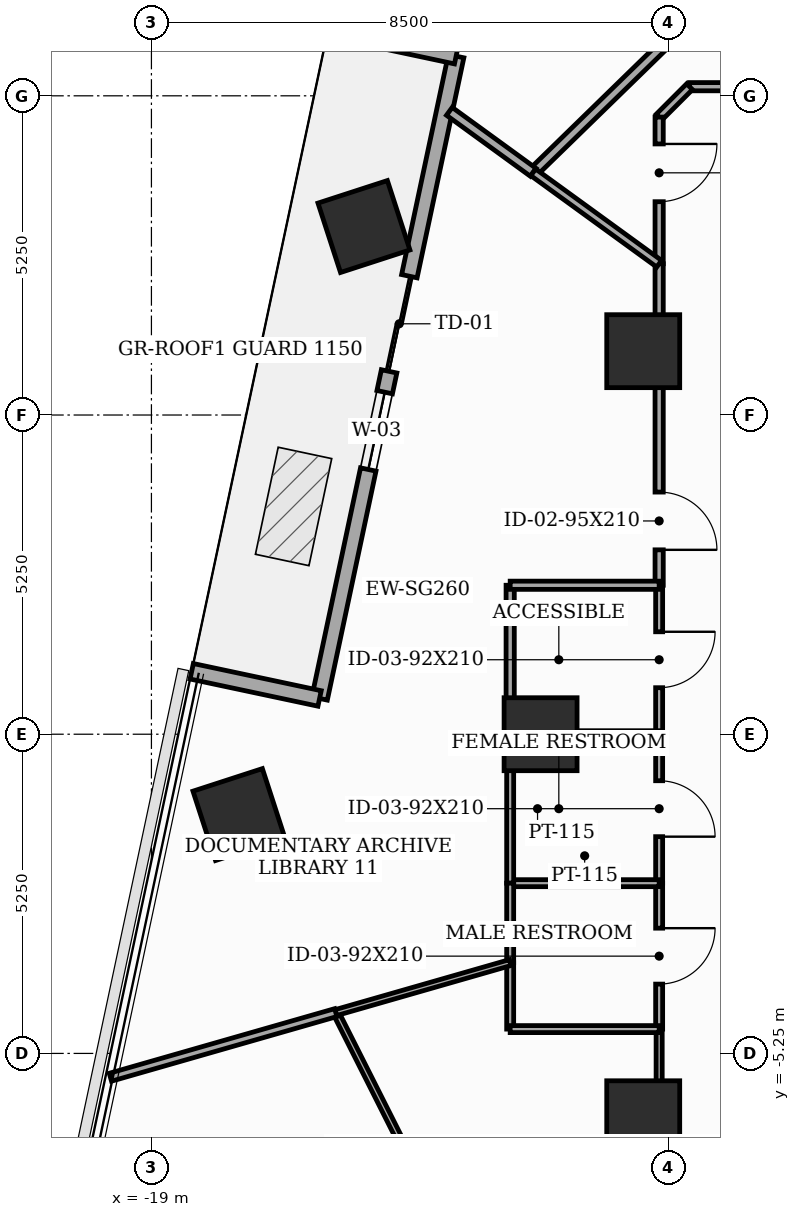
"""IFC4 building model, lengths in metres.
Left out: names, types, materials, properties, quantities, classifications, styles, units other than length and angle.
Written with IfcOpenShell. Run it as: python <this file> out.ifc"""

import sys

from ifc_helpers import new_model, si_unit, direction, frame, frame_2d, origin, origin_2d, place, context, subcontext, project, spatial, rectangle, extrude, element, fill, save


model = new_model("IFC4")
c1 = context("Model", 3, precision=1e-05, world=origin(), true_north=direction((0.0, 1.0)))
c2 = subcontext(c1, "Body", "Model", "MODEL_VIEW")
j1 = project(units=[si_unit("LENGTHUNIT", "METRE"), si_unit("PLANEANGLEUNIT", "RADIAN")], contexts=[c1])
p1 = place(None, origin())
s1 = spatial("IfcSite", under=j1, at=p1, CompositionType="ELEMENT")
p2 = place(p1, origin())
s2 = spatial("IfcBuilding", under=s1, at=p2, CompositionType="ELEMENT")
p3 = place(p2, frame((0.0, 0.0, 97.7)))
s3 = spatial("IfcBuildingStorey", under=s2, at=p3, CompositionType="ELEMENT", Elevation=97.7)
for number, where, z_axis, x_axis in (
    (1, (-10.912, 6.3, 0.0), (0.0, 0.0, 1.0), (1.0, 0.0, 0.0)),
    (2, (-12.6, 0.0, 0.0), (0.0, 0.0, 1.0), (1.0, 0.0, 0.0)),
    (3, (-10.912, -6.3, 0.0), (0.0, 0.0, 1.0), (1.0, 0.0, 0.0)),
    (4, (-15.505, 8.35, 0.0), (0.0, 0.0, 1.0), (0.951, 0.309, 0.0)),
    (5, (-17.561, -1.322, 0.0), (0.0, 0.0, 1.0), (0.951, 0.309, 0.0)),
):
    element("IfcColumn", number, at=place(p3, frame(where, z_axis=z_axis, x_axis=x_axis)), inside=s3, PredefinedType="COLUMN", context=c2, shape_type="SweptSolid", body=[
        extrude(rectangle(XDim=1.2, YDim=1.2, at=origin_2d()), origin(), (0.0, 0.0, 1.0), 3.7),
    ])
p4 = place(p3, frame((-13.989, 11.152, 0.0), z_axis=(0.0, 0.0, 1.0), x_axis=(-0.207926345708, -0.978144485626, 0.0)))
e6 = element("IfcWall", 6, at=p4, inside=s3, PredefinedType="SOLIDWALL", context=c2, shape_type="SweptSolid", body=[
    extrude(rectangle(XDim=10.8, YDim=0.26, at=frame_2d((5.4, 0.0))), origin(), (0.0, 0.0, 1.0), 3.5),
])
p5 = place(p4, frame((3.7, 0.0, 0.0)))
e7 = element("IfcOpeningElement", 7, at=p5, cuts=e6, PredefinedType="OPENING", context=c2, shape_type="SweptSolid", body=[
    extrude(rectangle(XDim=1.6, YDim=2.08, at=frame_2d((0.8, 1.04))), frame((0.0, 0.14, 0.0), z_axis=(0.0, -1.0, 0.0), x_axis=(1.0, 0.0, 0.0)), (0.0, 0.0, 1.0), 0.28),
])
p6 = place(p4, frame((5.65, 0.0, 0.85)))
e8 = element("IfcOpeningElement", 8, at=p6, cuts=e6, PredefinedType="OPENING", context=c2, shape_type="SweptSolid", body=[
    extrude(rectangle(XDim=1.3, YDim=1.25, at=frame_2d((0.65, 0.625))), frame((0.0, 0.14, 0.0), z_axis=(0.0, -1.0, 0.0), x_axis=(1.0, 0.0, 0.0)), (0.0, 0.0, 1.0), 0.28),
])
for number, where, z_axis, x_axis in (
    (9, (-16.092, 11.599, 0.0), (0.0, 0.0, 1.0), (0.978, -0.208, 0.0)),
    (10, (-16.235, 0.588, 0.0), (0.0, 0.0, 1.0), (-0.978, 0.208, 0.0)),
):
    element("IfcWall", number, at=place(p3, frame(where, z_axis=z_axis, x_axis=x_axis)), inside=s3, PredefinedType="SOLIDWALL", context=c2, shape_type="SweptSolid", body=[
        extrude(rectangle(XDim=2.15, YDim=0.26, at=frame_2d((1.075, 0.0))), origin(), (0.0, 0.0, 1.0), 3.5),
    ])
p7 = place(p3, frame((-10.65, 0.0, 0.0), z_axis=(0.0, 0.0, 1.0), x_axis=(0.0, -1.0, 0.0)))
e11 = element("IfcWall", 11, at=p7, inside=s3, PredefinedType="PARTITIONING", context=c2, shape_type="SweptSolid", body=[
    extrude(rectangle(XDim=2.45, YDim=0.115, at=frame_2d((1.225, 0.0))), origin(), (0.0, 0.0, 1.0), 2.785),
])
p8 = place(p7, frame((0.765, 0.0, 0.0)))
e12 = element("IfcOpeningElement", 12, at=p8, cuts=e11, PredefinedType="OPENING", context=c2, shape_type="SweptSolid", body=[
    extrude(rectangle(XDim=0.92, YDim=2.1, at=frame_2d((0.46, 1.05))), frame((0.0, 0.067, 0.0), z_axis=(0.0, -1.0, 0.0), x_axis=(1.0, 0.0, 0.0)), (0.0, 0.0, 1.0), 0.135),
])
p9 = place(p3, frame((-10.65, -2.45, 0.0), z_axis=(0.0, 0.0, 1.0), x_axis=(0.0, -1.0, 0.0)))
e13 = element("IfcWall", 13, at=p9, inside=s3, PredefinedType="PARTITIONING", context=c2, shape_type="SweptSolid", body=[
    extrude(rectangle(XDim=2.4, YDim=0.115, at=frame_2d((1.2, 0.0))), origin(), (0.0, 0.0, 1.0), 3.5),
])
p10 = place(p9, frame((0.74, 0.0, 0.0)))
e14 = element("IfcOpeningElement", 14, at=p10, cuts=e13, PredefinedType="OPENING", context=c2, shape_type="SweptSolid", body=[
    extrude(rectangle(XDim=0.92, YDim=2.1, at=frame_2d((0.46, 1.05))), frame((0.0, 0.067, 0.0), z_axis=(0.0, -1.0, 0.0), x_axis=(1.0, 0.0, 0.0)), (0.0, 0.0, 1.0), 0.135),
])
p11 = place(p3, frame((-10.65, -4.85, 0.0), z_axis=(0.0, 0.0, 1.0), x_axis=(0.0, -1.0, 0.0)))
e15 = element("IfcWall", 15, at=p11, inside=s3, PredefinedType="MOVABLE", context=c2, shape_type="SweptSolid", body=[
    extrude(rectangle(XDim=5.3, YDim=0.1, at=frame_2d((2.65, 0.0))), origin(), (0.0, 0.0, 1.0), 2.785),
])
p12 = place(p11, frame((3.765, 0.0, 0.0)))
e16 = element("IfcOpeningElement", 16, at=p12, cuts=e15, PredefinedType="OPENING", context=c2, shape_type="SweptSolid", body=[
    extrude(rectangle(XDim=0.95, YDim=2.1, at=frame_2d((0.475, 1.05))), frame((0.0, 0.06, 0.0), z_axis=(0.0, -1.0, 0.0), x_axis=(1.0, 0.0, 0.0)), (0.0, 0.0, 1.0), 0.12),
])
p13 = place(p3, frame((-2.264, 10.65, 0.0), z_axis=(0.0, 0.0, 1.0), x_axis=(-1.0, 0.0, 0.0)))
e17 = element("IfcWall", 17, at=p13, inside=s3, PredefinedType="PARTITIONING", context=c2, shape_type="SweptSolid", body=[
    extrude(rectangle(XDim=7.886, YDim=0.135, at=frame_2d((3.943, 0.0))), origin(), (0.0, 0.0, 1.0), 2.785),
])
p14 = place(p3, frame((-10.15, 10.65, 0.0), z_axis=(0.0, 0.0, 1.0), x_axis=(-0.707106781187, -0.707106781187, 0.0)))
e18 = element("IfcWall", 18, at=p14, inside=s3, PredefinedType="PARTITIONING", context=c2, shape_type="SweptSolid", body=[
    extrude(rectangle(XDim=0.707, YDim=0.135, at=frame_2d((0.354, 0.0))), origin(), (0.0, 0.0, 1.0), 3.5),
])
p15 = place(p3, frame((-10.65, 10.15, 0.0), z_axis=(0.0, 0.0, 1.0), x_axis=(0.0, -1.0, 0.0)))
e19 = element("IfcWall", 19, at=p15, inside=s3, PredefinedType="PARTITIONING", context=c2, shape_type="SweptSolid", body=[
    extrude(rectangle(XDim=2.412, YDim=0.135, at=frame_2d((1.206, 0.0))), origin(), (0.0, 0.0, 1.0), 3.5),
])
p16 = place(p15, frame((0.442, 0.0, 0.0)))
e20 = element("IfcOpeningElement", 20, at=p16, cuts=e19, PredefinedType="OPENING", context=c2, shape_type="SweptSolid", body=[
    extrude(rectangle(XDim=0.95, YDim=2.1, at=frame_2d((0.475, 1.05))), frame((0.0, 0.077, 0.0), z_axis=(0.0, -1.0, 0.0), x_axis=(1.0, 0.0, 0.0)), (0.0, 0.0, 1.0), 0.155),
])
p17 = place(p3, frame((-10.65, 7.738, 0.0), z_axis=(0.0, 0.0, 1.0), x_axis=(0.0, -1.0, 0.0)))
e21 = element("IfcWall", 21, at=p17, inside=s3, PredefinedType="PARTITIONING", context=c2, shape_type="SweptSolid", body=[
    extrude(rectangle(XDim=5.288, YDim=0.135, at=frame_2d((2.644, 0.0))), origin(), (0.0, 0.0, 1.0), 2.785),
])
p18 = place(p17, frame((3.755, 0.0, 0.0)))
e22 = element("IfcOpeningElement", 22, at=p18, cuts=e21, PredefinedType="OPENING", context=c2, shape_type="SweptSolid", body=[
    extrude(rectangle(XDim=0.95, YDim=2.1, at=frame_2d((0.475, 1.05))), frame((0.0, 0.077, 0.0), z_axis=(0.0, -1.0, 0.0), x_axis=(1.0, 0.0, 0.0)), (0.0, 0.0, 1.0), 0.155),
])
p19 = place(p3, frame((-10.65, 2.45, 0.0), z_axis=(0.0, 0.0, 1.0), x_axis=(0.0, -1.0, 0.0)))
e23 = element("IfcWall", 23, at=p19, inside=s3, PredefinedType="PARTITIONING", context=c2, shape_type="SweptSolid", body=[
    extrude(rectangle(XDim=2.45, YDim=0.115, at=frame_2d((1.225, 0.0))), origin(), (0.0, 0.0, 1.0), 2.785),
])
p20 = place(p19, frame((0.765, 0.0, 0.0)))
e24 = element("IfcOpeningElement", 24, at=p20, cuts=e23, PredefinedType="OPENING", context=c2, shape_type="SweptSolid", body=[
    extrude(rectangle(XDim=0.92, YDim=2.1, at=frame_2d((0.46, 1.05))), frame((0.0, 0.067, 0.0), z_axis=(0.0, -1.0, 0.0), x_axis=(1.0, 0.0, 0.0)), (0.0, 0.0, 1.0), 0.135),
])
p21 = place(p3, frame((-13.1, -2.45, 0.0), z_axis=(0.0, 0.0, 1.0), x_axis=(1.0, 0.0, 0.0)))
e25 = element("IfcWall", 25, at=p21, inside=s3, PredefinedType="PARTITIONING", context=c2, shape_type="SweptSolid", body=[
    extrude(rectangle(XDim=2.45, YDim=0.115, at=frame_2d((1.225, 0.0))), origin(), (0.0, 0.0, 1.0), 2.785),
])
p22 = place(p3, frame((-13.1, 0.0, 0.0), z_axis=(0.0, 0.0, 1.0), x_axis=(0.0, -1.0, 0.0)))
e26 = element("IfcWall", 26, at=p22, inside=s3, PredefinedType="PARTITIONING", context=c2, shape_type="SweptSolid", body=[
    extrude(rectangle(XDim=2.45, YDim=0.115, at=frame_2d((1.225, 0.0))), origin(), (0.0, 0.0, 1.0), 2.785),
])
p23 = place(p3, frame((-10.65, 0.0, 0.0), z_axis=(0.0, 0.0, 1.0), x_axis=(-1.0, 0.0, 0.0)))
e27 = element("IfcWall", 27, at=p23, inside=s3, PredefinedType="PARTITIONING", context=c2, shape_type="SweptSolid", body=[
    extrude(rectangle(XDim=2.45, YDim=0.115, at=frame_2d((1.225, 0.0))), origin(), (0.0, 0.0, 1.0), 2.785),
])
p24 = place(p3, frame((-13.1, -3.756, 0.0), z_axis=(0.0, 0.0, 1.0), x_axis=(0.0, -1.0, 0.0)))
e28 = element("IfcWall", 28, at=p24, inside=s3, PredefinedType="PARTITIONING", context=c2, shape_type="SweptSolid", body=[
    extrude(rectangle(XDim=1.094, YDim=0.115, at=frame_2d((0.547, 0.0))), origin(), (0.0, 0.0, 1.0), 3.5),
])
p25 = place(p3, frame((-13.1, -4.85, 0.0), z_axis=(0.0, 0.0, 1.0), x_axis=(1.0, 0.0, 0.0)))
e29 = element("IfcWall", 29, at=p25, inside=s3, PredefinedType="PARTITIONING", context=c2, shape_type="SweptSolid", body=[
    extrude(rectangle(XDim=2.45, YDim=0.115, at=frame_2d((1.225, 0.0))), origin(), (0.0, 0.0, 1.0), 2.785),
])
p26 = place(p3, frame((-13.1, -2.45, 0.0), z_axis=(0.0, 0.0, 1.0), x_axis=(0.0, -1.0, 0.0)))
e30 = element("IfcWall", 30, at=p26, inside=s3, PredefinedType="PARTITIONING", context=c2, shape_type="SweptSolid", body=[
    extrude(rectangle(XDim=1.306, YDim=0.115, at=frame_2d((0.653, 0.0))), origin(), (0.0, 0.0, 1.0), 3.5),
])
p27 = place(p3, frame((-15.968, -4.579, 0.0), z_axis=(0.0, 0.0, 1.0), x_axis=(0.450166439867, -0.892944665933, 0.0)))
e31 = element("IfcWall", 31, at=p27, inside=s3, PredefinedType="MOVABLE", context=c2, shape_type="SweptSolid", body=[
    extrude(rectangle(XDim=6.642, YDim=0.1, at=frame_2d((3.321, 0.0))), origin(), (0.0, 0.0, 1.0), 2.785),
])
p28 = place(p3, frame((-13.1, -3.756, 0.0), z_axis=(0.0, 0.0, 1.0), x_axis=(-0.961205264208, -0.275834080671, 0.0)))
e32 = element("IfcWall", 32, at=p28, inside=s3, PredefinedType="MOVABLE", context=c2, shape_type="SweptSolid", body=[
    extrude(rectangle(XDim=2.984, YDim=0.1, at=frame_2d((1.492, 0.0))), origin(), (0.0, 0.0, 1.0), 3.125),
])
p29 = place(p3, frame((-15.968, -4.579, 0.0), z_axis=(0.0, 0.0, 1.0), x_axis=(-0.961294264275, -0.275523751194, 0.0)))
e33 = element("IfcWall", 33, at=p29, inside=s3, PredefinedType="PARTITIONING", context=c2, shape_type="SweptSolid", body=[
    extrude(rectangle(XDim=3.856, YDim=0.135, at=frame_2d((1.928, 0.0))), origin(), (0.0, 0.0, 1.0), 2.935),
])
p30 = place(p3, frame((-12.721, 9.242, 0.0), z_axis=(0.0, 0.0, 1.0), x_axis=(0.716351016203, 0.697740081682, 0.0)))
e34 = element("IfcWall", 34, at=p30, inside=s3, PredefinedType="PARTITIONING", context=c2, shape_type="SweptSolid", body=[
    extrude(rectangle(XDim=5.746, YDim=0.16, at=frame_2d((2.873, 0.0))), origin(), (0.0, 0.0, 1.0), 2.785),
])
p31 = place(p3, frame((-14.1, 10.245, 0.0), z_axis=(0.0, 0.0, 1.0), x_axis=(0.808828948323, -0.588043988452, 0.0)))
e35 = element("IfcWall", 35, at=p31, inside=s3, PredefinedType="PARTITIONING", context=c2, shape_type="SweptSolid", body=[
    extrude(rectangle(XDim=1.705, YDim=0.16, at=frame_2d((0.853, 0.0))), origin(), (0.0, 0.0, 1.0), 3.125),
])
p32 = place(p3, frame((-12.721, 9.242, 0.0), z_axis=(0.0, 0.0, 1.0), x_axis=(0.80916485127, -0.58758169089, 0.0)))
e36 = element("IfcWall", 36, at=p32, inside=s3, PredefinedType="PARTITIONING", context=c2, shape_type="SweptSolid", body=[
    extrude(rectangle(XDim=2.56, YDim=0.135, at=frame_2d((1.28, 0.0))), origin(), (0.0, 0.0, 1.0), 3.125),
])
p33 = place(p3, frame((-13.1, 0.0, 0.0), z_axis=(0.0, 0.0, 1.0), x_axis=(0.0, 1.0, 0.0)))
e37 = element("IfcWall", 37, at=p33, inside=s3, PredefinedType="PARTITIONING", context=c2, shape_type="SweptSolid", body=[
    extrude(rectangle(XDim=2.45, YDim=0.135, at=frame_2d((1.225, 0.0))), origin(), (0.0, 0.0, 1.0), 2.785),
])
p34 = place(p3, frame((-13.1, 2.45, 0.0), z_axis=(0.0, 0.0, 1.0), x_axis=(1.0, 0.0, 0.0)))
e38 = element("IfcWall", 38, at=p34, inside=s3, PredefinedType="PARTITIONING", context=c2, shape_type="SweptSolid", body=[
    extrude(rectangle(XDim=2.45, YDim=0.135, at=frame_2d((1.225, 0.0))), origin(), (0.0, 0.0, 1.0), 2.785),
])
p35 = place(p5, frame((1.6, 0.0, 0.0), z_axis=(0.0, 0.0, 1.0), x_axis=(-1.0, 0.0, 0.0)))
e39 = element("IfcDoor", 39, at=p35, inside=s3, OperationType="DOUBLE_DOOR_SLIDING", PredefinedType="DOOR", context=c2, shape_type="SweptSolid", body=[
    extrude(rectangle(XDim=1.6, YDim=2.08, at=frame_2d((0.8, 1.04))), frame((0.0, 0.025, 0.0), z_axis=(0.0, -1.0, 0.0), x_axis=(1.0, 0.0, 0.0)), (0.0, 0.0, 1.0), 0.05),
])
fill(e7, e39)
p36 = place(p6, origin())
e40 = element("IfcWindow", 40, at=p36, inside=s3, PartitioningType="SINGLE_PANEL", PredefinedType="WINDOW", context=c2, shape_type="SweptSolid", body=[
    extrude(rectangle(XDim=1.3, YDim=1.25, at=frame_2d((0.65, 0.625))), frame((0.0, 0.03, 0.0), z_axis=(0.0, -1.0, 0.0), x_axis=(1.0, 0.0, 0.0)), (0.0, 0.0, 1.0), 0.06),
])
fill(e8, e40)
p37 = place(p8, origin())
e41 = element("IfcDoor", 41, at=p37, inside=s3, OperationType="SINGLE_SWING_RIGHT", PredefinedType="DOOR", context=c2, shape_type="SweptSolid", body=[
    extrude(rectangle(XDim=0.92, YDim=2.1, at=frame_2d((0.46, 1.05))), frame((0.0, 0.025, 0.0), z_axis=(0.0, -1.0, 0.0), x_axis=(1.0, 0.0, 0.0)), (0.0, 0.0, 1.0), 0.05),
])
fill(e12, e41)
p38 = place(p10, origin())
e42 = element("IfcDoor", 42, at=p38, inside=s3, OperationType="SINGLE_SWING_LEFT", PredefinedType="DOOR", context=c2, shape_type="SweptSolid", body=[
    extrude(rectangle(XDim=0.92, YDim=2.1, at=frame_2d((0.46, 1.05))), frame((0.0, 0.025, 0.0), z_axis=(0.0, -1.0, 0.0), x_axis=(1.0, 0.0, 0.0)), (0.0, 0.0, 1.0), 0.05),
])
fill(e14, e42)
p39 = place(p16, origin())
e43 = element("IfcDoor", 43, at=p39, inside=s3, OperationType="SINGLE_SWING_LEFT", PredefinedType="DOOR", context=c2, shape_type="SweptSolid", body=[
    extrude(rectangle(XDim=0.95, YDim=2.1, at=frame_2d((0.475, 1.05))), frame((0.0, 0.025, 0.0), z_axis=(0.0, -1.0, 0.0), x_axis=(1.0, 0.0, 0.0)), (0.0, 0.0, 1.0), 0.05),
])
fill(e20, e43)
p40 = place(p18, origin())
e44 = element("IfcDoor", 44, at=p40, inside=s3, OperationType="SINGLE_SWING_RIGHT", PredefinedType="DOOR", context=c2, shape_type="SweptSolid", body=[
    extrude(rectangle(XDim=0.95, YDim=2.1, at=frame_2d((0.475, 1.05))), frame((0.0, 0.025, 0.0), z_axis=(0.0, -1.0, 0.0), x_axis=(1.0, 0.0, 0.0)), (0.0, 0.0, 1.0), 0.05),
])
fill(e22, e44)
p41 = place(p20, origin())
e45 = element("IfcDoor", 45, at=p41, inside=s3, OperationType="SINGLE_SWING_LEFT", PredefinedType="DOOR", context=c2, shape_type="SweptSolid", body=[
    extrude(rectangle(XDim=0.92, YDim=2.1, at=frame_2d((0.46, 1.05))), frame((0.0, 0.025, 0.0), z_axis=(0.0, -1.0, 0.0), x_axis=(1.0, 0.0, 0.0)), (0.0, 0.0, 1.0), 0.05),
])
fill(e24, e45)
save(model, sys.argv[1])
